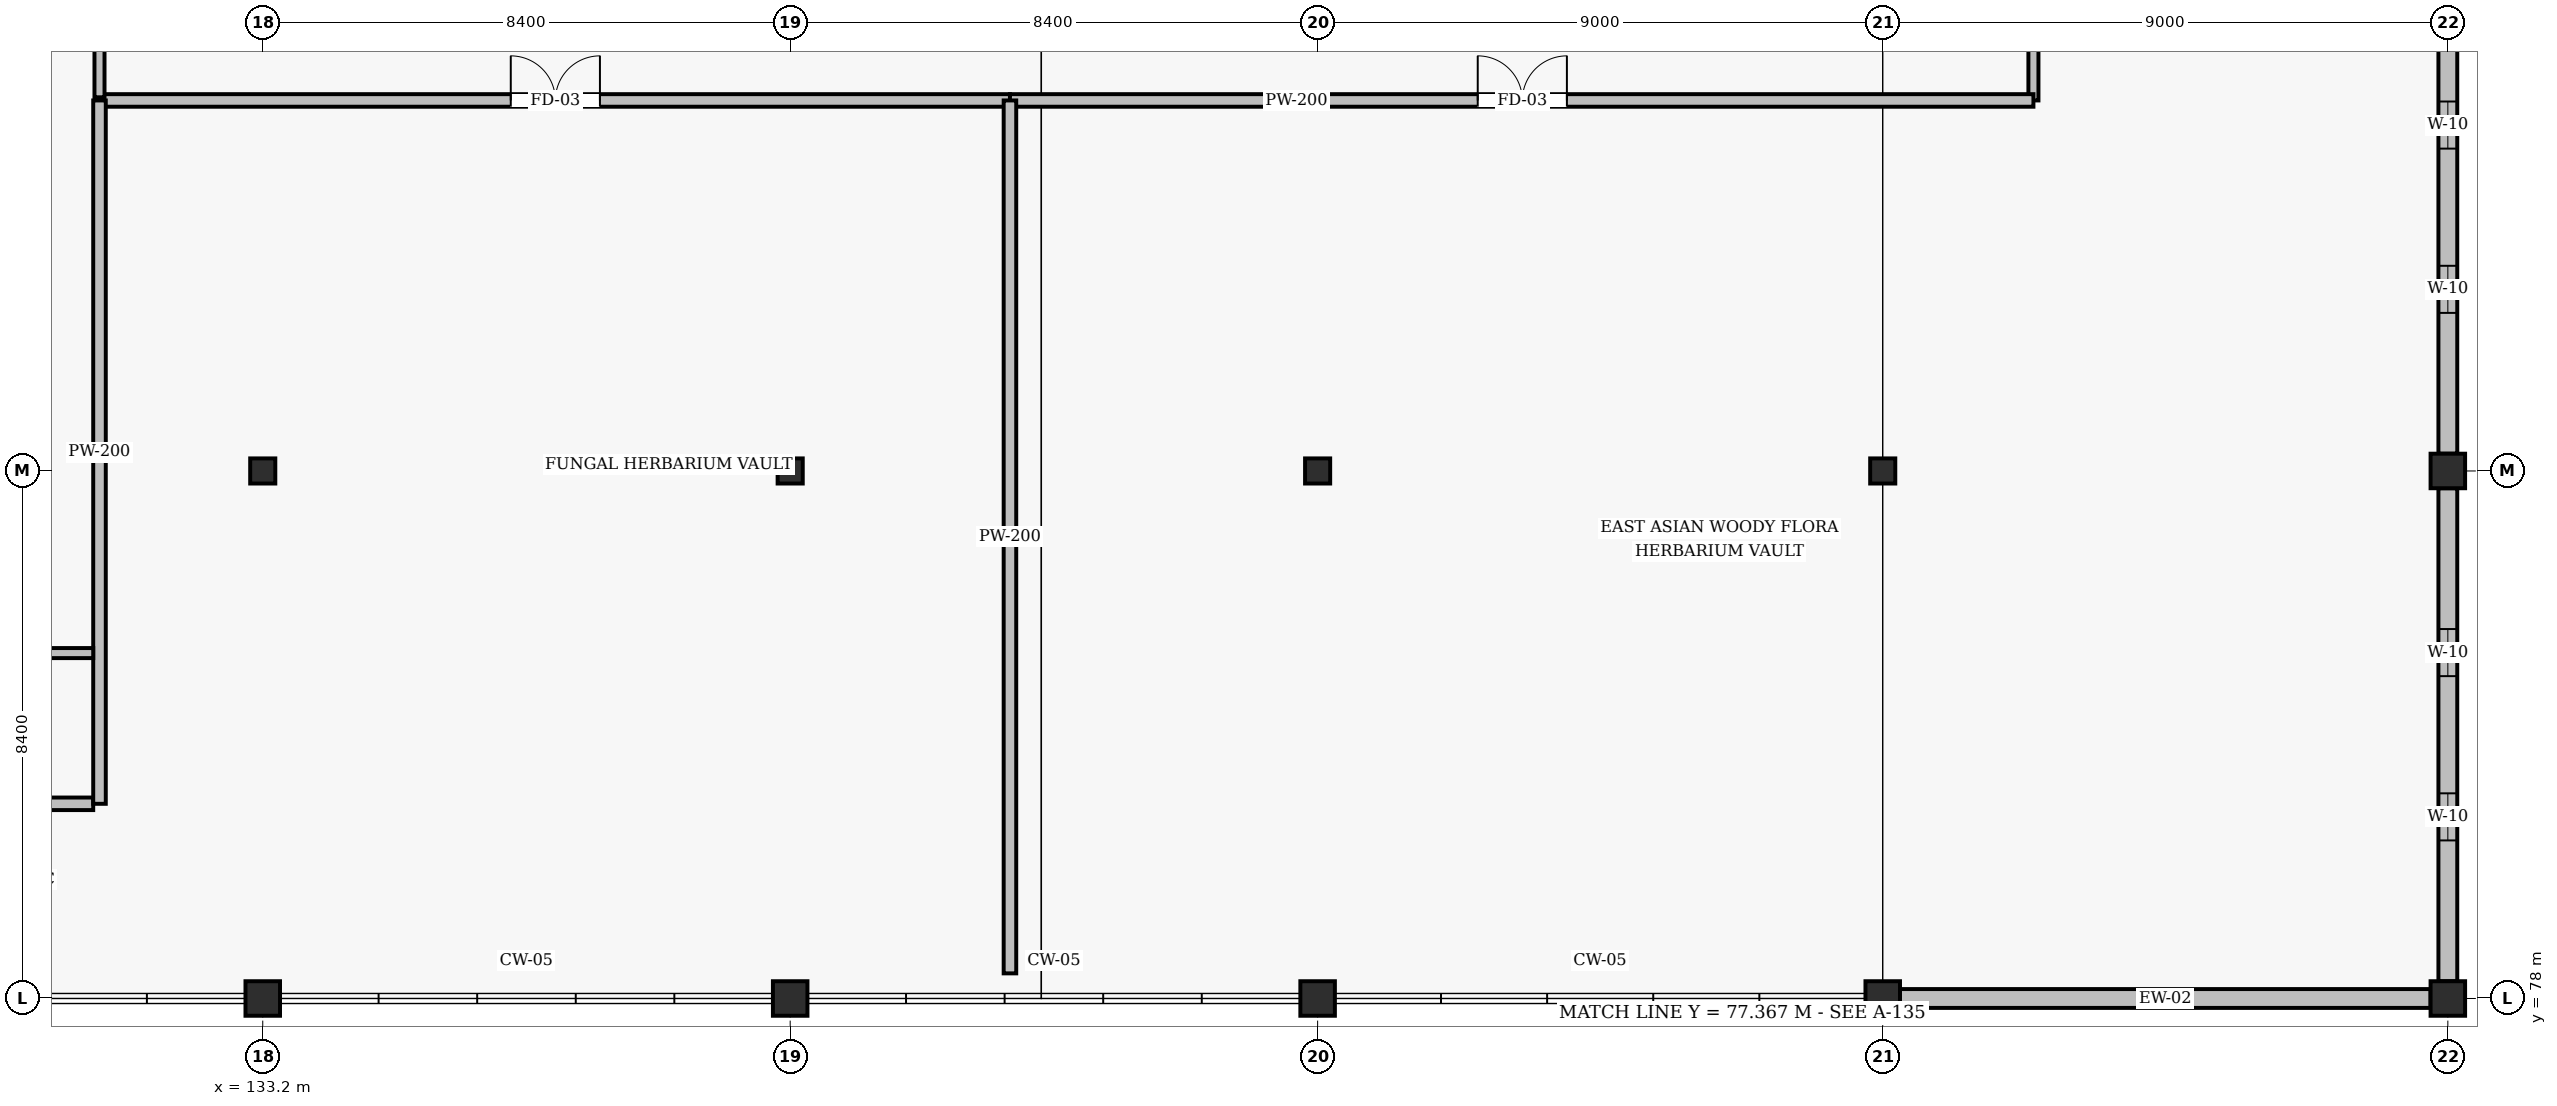
"""IFC4 building model, lengths in metres.
Left out: names, types, materials, properties, quantities, classifications, styles, units other than length and angle.
Written with IfcOpenShell. Run it as: python <this file> out.ifc"""

import sys

from ifc_helpers import new_model, si_unit, direction, frame, frame_2d, origin, origin_2d, place, context, subcontext, project, spatial, rectangle, hollow_rectangle, i_section, extrude, element, fill, save


model = new_model("IFC4")
c1 = context("Model", 3, precision=1e-05, world=origin(), true_north=direction((0.0, 1.0)))
c2 = subcontext(c1, "Body", "Model", "MODEL_VIEW")
j1 = project(units=[si_unit("LENGTHUNIT", "METRE"), si_unit("PLANEANGLEUNIT", "RADIAN")], contexts=[c1])
p1 = place(None, origin())
s1 = spatial("IfcSite", under=j1, at=p1, CompositionType="ELEMENT")
p2 = place(p1, origin())
s2 = spatial("IfcBuilding", under=s1, at=p2, CompositionType="ELEMENT")
p3 = place(p2, frame((0.0, 0.0, 13.2)))
s3 = spatial("IfcBuildingStorey", under=s2, at=p3, CompositionType="ELEMENT", Elevation=13.2)
p4 = place(p3, frame((133.2, 78.0, 0.0), z_axis=(0.0, 0.0, 1.0), x_axis=(1.0, 0.0, 0.0)))
e1 = element("IfcColumn", 1, at=p4, inside=s3, PredefinedType="COLUMN", context=c2, shape_type="SweptSolid", body=[
    extrude(hollow_rectangle(XDim=0.55, YDim=0.55, WallThickness=0.022, InnerFilletRadius=0.022, OuterFilletRadius=0.044, at=origin_2d()), origin(), (0.0, 0.0, 1.0), 3.9),
])
p5 = place(p3, frame((133.2, 86.4, 0.0), z_axis=(0.0, 0.0, 1.0), x_axis=(1.0, 0.0, 0.0)))
e2 = element("IfcColumn", 2, at=p5, inside=s3, PredefinedType="COLUMN", context=c2, shape_type="SweptSolid", body=[
    extrude(i_section(OverallWidth=0.4, OverallDepth=0.4, WebThickness=0.013, FlangeThickness=0.021, FilletRadius=0.022, at=origin_2d()), origin(), (0.0, 0.0, 1.0), 3.9),
])
p6 = place(p3, frame((141.6, 78.0, 0.0), z_axis=(0.0, 0.0, 1.0), x_axis=(1.0, 0.0, 0.0)))
e3 = element("IfcColumn", 3, at=p6, inside=s3, PredefinedType="COLUMN", context=c2, shape_type="SweptSolid", body=[
    extrude(hollow_rectangle(XDim=0.55, YDim=0.55, WallThickness=0.022, InnerFilletRadius=0.022, OuterFilletRadius=0.044, at=origin_2d()), origin(), (0.0, 0.0, 1.0), 3.9),
])
p7 = place(p3, frame((141.6, 86.4, 0.0), z_axis=(0.0, 0.0, 1.0), x_axis=(1.0, 0.0, 0.0)))
e4 = element("IfcColumn", 4, at=p7, inside=s3, PredefinedType="COLUMN", context=c2, shape_type="SweptSolid", body=[
    extrude(i_section(OverallWidth=0.4, OverallDepth=0.4, WebThickness=0.013, FlangeThickness=0.021, FilletRadius=0.022, at=origin_2d()), origin(), (0.0, 0.0, 1.0), 3.9),
])
p8 = place(p3, frame((150.0, 78.0, 0.0), z_axis=(0.0, 0.0, 1.0), x_axis=(1.0, 0.0, 0.0)))
e5 = element("IfcColumn", 5, at=p8, inside=s3, PredefinedType="COLUMN", context=c2, shape_type="SweptSolid", body=[
    extrude(hollow_rectangle(XDim=0.55, YDim=0.55, WallThickness=0.022, InnerFilletRadius=0.022, OuterFilletRadius=0.044, at=origin_2d()), origin(), (0.0, 0.0, 1.0), 3.9),
])
p9 = place(p3, frame((150.0, 86.4, 0.0), z_axis=(0.0, 0.0, 1.0), x_axis=(1.0, 0.0, 0.0)))
e6 = element("IfcColumn", 6, at=p9, inside=s3, PredefinedType="COLUMN", context=c2, shape_type="SweptSolid", body=[
    extrude(i_section(OverallWidth=0.4, OverallDepth=0.4, WebThickness=0.013, FlangeThickness=0.021, FilletRadius=0.022, at=origin_2d()), origin(), (0.0, 0.0, 1.0), 3.9),
])
p10 = place(p3, frame((159.0, 78.0, 0.0), z_axis=(0.0, 0.0, 1.0), x_axis=(1.0, 0.0, 0.0)))
e7 = element("IfcColumn", 7, at=p10, inside=s3, PredefinedType="COLUMN", context=c2, shape_type="SweptSolid", body=[
    extrude(hollow_rectangle(XDim=0.55, YDim=0.55, WallThickness=0.022, InnerFilletRadius=0.022, OuterFilletRadius=0.044, at=origin_2d()), origin(), (0.0, 0.0, 1.0), 3.9),
])
p11 = place(p3, frame((159.0, 86.4, 0.0), z_axis=(0.0, 0.0, 1.0), x_axis=(1.0, 0.0, 0.0)))
e8 = element("IfcColumn", 8, at=p11, inside=s3, PredefinedType="COLUMN", context=c2, shape_type="SweptSolid", body=[
    extrude(i_section(OverallWidth=0.4, OverallDepth=0.4, WebThickness=0.013, FlangeThickness=0.021, FilletRadius=0.022, at=origin_2d()), origin(), (0.0, 0.0, 1.0), 3.9),
])
for number, where, z_axis, x_axis in (
    (9, (168.0, 78.0, 0.0), (0.0, 0.0, 1.0), (1.0, 0.0, 0.0)),
    (10, (168.0, 86.4, 0.0), (0.0, 0.0, 1.0), (1.0, 0.0, 0.0)),
):
    element("IfcColumn", number, at=place(p3, frame(where, z_axis=z_axis, x_axis=x_axis)), inside=s3, PredefinedType="COLUMN", context=c2, shape_type="SweptSolid", body=[
        extrude(hollow_rectangle(XDim=0.55, YDim=0.55, WallThickness=0.022, InnerFilletRadius=0.022, OuterFilletRadius=0.044, at=origin_2d()), origin(), (0.0, 0.0, 1.0), 3.9),
    ])
p12 = place(p3, frame((168.0, 78.275, 0.0), z_axis=(0.0, 0.0, 1.0), x_axis=(0.0, 1.0, 0.0)))
e11 = element("IfcWall", 11, at=p12, inside=s3, PredefinedType="SOLIDWALL", context=c2, shape_type="SweptSolid", body=[
    extrude(rectangle(XDim=7.85, YDim=0.3, at=frame_2d((3.925, 0.0))), origin(), (0.0, 0.0, 1.0), 3.12),
])
p13 = place(p12, frame((2.242, 0.0, 1.05)))
e12 = element("IfcOpeningElement", 12, at=p13, cuts=e11, PredefinedType="OPENING", context=c2, shape_type="SweptSolid", body=[
    extrude(rectangle(XDim=0.75, YDim=1.6, at=frame_2d((0.375, 0.8))), frame((0.0, 0.16, 0.0), z_axis=(0.0, -1.0, 0.0), x_axis=(1.0, 0.0, 0.0)), (0.0, 0.0, 1.0), 0.32),
])
p14 = place(p12, frame((4.858, 0.0, 1.05)))
e13 = element("IfcOpeningElement", 13, at=p14, cuts=e11, PredefinedType="OPENING", context=c2, shape_type="SweptSolid", body=[
    extrude(rectangle(XDim=0.75, YDim=1.6, at=frame_2d((0.375, 0.8))), frame((0.0, 0.16, 0.0), z_axis=(0.0, -1.0, 0.0), x_axis=(1.0, 0.0, 0.0)), (0.0, 0.0, 1.0), 0.32),
])
p15 = place(p3, frame((168.0, 86.675, 0.0), z_axis=(0.0, 0.0, 1.0), x_axis=(0.0, 1.0, 0.0)))
e14 = element("IfcWall", 14, at=p15, inside=s3, PredefinedType="SOLIDWALL", context=c2, shape_type="SweptSolid", body=[
    extrude(rectangle(XDim=7.85, YDim=0.3, at=frame_2d((3.925, 0.0))), origin(), (0.0, 0.0, 1.0), 3.12),
])
p16 = place(p15, frame((2.242, 0.0, 1.05)))
e15 = element("IfcOpeningElement", 15, at=p16, cuts=e14, PredefinedType="OPENING", context=c2, shape_type="SweptSolid", body=[
    extrude(rectangle(XDim=0.75, YDim=1.6, at=frame_2d((0.375, 0.8))), frame((0.0, 0.16, 0.0), z_axis=(0.0, -1.0, 0.0), x_axis=(1.0, 0.0, 0.0)), (0.0, 0.0, 1.0), 0.32),
])
p17 = place(p15, frame((4.858, 0.0, 1.05)))
e16 = element("IfcOpeningElement", 16, at=p17, cuts=e14, PredefinedType="OPENING", context=c2, shape_type="SweptSolid", body=[
    extrude(rectangle(XDim=0.75, YDim=1.6, at=frame_2d((0.375, 0.8))), frame((0.0, 0.16, 0.0), z_axis=(0.0, -1.0, 0.0), x_axis=(1.0, 0.0, 0.0)), (0.0, 0.0, 1.0), 0.32),
])
p18 = place(p3, frame((159.275, 78.0, 0.0), z_axis=(0.0, 0.0, 1.0), x_axis=(1.0, 0.0, 0.0)))
e17 = element("IfcWall", 17, at=p18, inside=s3, PredefinedType="SOLIDWALL", context=c2, shape_type="SweptSolid", body=[
    extrude(rectangle(XDim=8.45, YDim=0.3, at=frame_2d((4.225, 0.0))), origin(), (0.0, 0.0, 1.0), 2.828),
])
p19 = place(p3, frame((161.4, 92.3, 0.0), z_axis=(0.0, 0.0, 1.0), x_axis=(0.0, 1.0, 0.0)))
e18 = element("IfcWall", 18, at=p19, inside=s3, PredefinedType="PARTITIONING", context=c2, shape_type="SweptSolid", body=[
    extrude(rectangle(XDim=14.1, YDim=0.16, at=frame_2d((7.05, 0.0))), origin(), (0.0, 0.0, 1.0), 2.97),
])
p20 = place(p19, frame((6.5, 0.0, 0.0)))
e19 = element("IfcOpeningElement", 19, at=p20, cuts=e18, PredefinedType="OPENING", context=c2, shape_type="SweptSolid", body=[
    extrude(rectangle(XDim=1.08, YDim=2.08, at=frame_2d((0.54, 1.04))), frame((0.0, 0.09, 0.0), z_axis=(0.0, -1.0, 0.0), x_axis=(1.0, 0.0, 0.0)), (0.0, 0.0, 1.0), 0.18),
])
p21 = place(p3, frame((116.8, 81.1, 0.0), z_axis=(0.0, 0.0, 1.0), x_axis=(1.0, 0.0, 0.0)))
e20 = element("IfcWall", 20, at=p21, inside=s3, PredefinedType="SOLIDWALL", context=c2, shape_type="SweptSolid", body=[
    extrude(rectangle(XDim=13.7, YDim=0.2, at=frame_2d((6.85, 0.0))), origin(), (0.0, 0.0, 1.0), 3.23),
])
p22 = place(p21, frame((6.25, 0.0, 0.0)))
e21 = element("IfcOpeningElement", 21, at=p22, cuts=e20, PredefinedType="OPENING", context=c2, shape_type="SweptSolid", body=[
    extrude(rectangle(XDim=1.18, YDim=2.15, at=frame_2d((0.59, 1.075))), frame((0.0, 0.11, 0.0), z_axis=(0.0, -1.0, 0.0), x_axis=(1.0, 0.0, 0.0)), (0.0, 0.0, 1.0), 0.22),
])
p23 = place(p3, frame((130.6, 92.3, 0.0), z_axis=(0.0, 0.0, 1.0), x_axis=(1.0, 0.0, 0.0)))
e22 = element("IfcWall", 22, at=p23, inside=s3, PredefinedType="SOLIDWALL", context=c2, shape_type="SweptSolid", body=[
    extrude(rectangle(XDim=14.5, YDim=0.2, at=frame_2d((7.25, 0.0))), origin(), (0.0, 0.0, 1.0), 3.23),
])
p24 = place(p23, frame((6.55, 0.0, 0.0)))
e23 = element("IfcOpeningElement", 23, at=p24, cuts=e22, PredefinedType="OPENING", context=c2, shape_type="SweptSolid", body=[
    extrude(rectangle(XDim=1.42, YDim=2.18, at=frame_2d((0.71, 1.09))), frame((0.0, 0.11, 0.0), z_axis=(0.0, -1.0, 0.0), x_axis=(1.0, 0.0, 0.0)), (0.0, 0.0, 1.0), 0.22),
])
p25 = place(p3, frame((145.1, 92.3, 0.0), z_axis=(0.0, 0.0, 1.0), x_axis=(1.0, 0.0, 0.0)))
e24 = element("IfcWall", 24, at=p25, inside=s3, PredefinedType="SOLIDWALL", context=c2, shape_type="SweptSolid", body=[
    extrude(rectangle(XDim=16.3, YDim=0.2, at=frame_2d((8.15, 0.0))), origin(), (0.0, 0.0, 1.0), 3.23),
])
p26 = place(p25, frame((7.45, 0.0, 0.0)))
e25 = element("IfcOpeningElement", 25, at=p26, cuts=e24, PredefinedType="OPENING", context=c2, shape_type="SweptSolid", body=[
    extrude(rectangle(XDim=1.42, YDim=2.18, at=frame_2d((0.71, 1.09))), frame((0.0, 0.11, 0.0), z_axis=(0.0, -1.0, 0.0), x_axis=(1.0, 0.0, 0.0)), (0.0, 0.0, 1.0), 0.22),
])
p27 = place(p3, frame((145.1, 78.4, 0.0), z_axis=(0.0, 0.0, 1.0), x_axis=(0.0, 1.0, 0.0)))
e26 = element("IfcWall", 26, at=p27, inside=s3, PredefinedType="SOLIDWALL", context=c2, shape_type="SweptSolid", body=[
    extrude(rectangle(XDim=13.9, YDim=0.2, at=frame_2d((6.95, 0.0))), origin(), (0.0, 0.0, 1.0), 3.07),
])
p28 = place(p3, frame((130.6, 81.1, 0.0), z_axis=(0.0, 0.0, 1.0), x_axis=(0.0, 1.0, 0.0)))
e27 = element("IfcWall", 27, at=p28, inside=s3, PredefinedType="SOLIDWALL", context=c2, shape_type="SweptSolid", body=[
    extrude(rectangle(XDim=11.2, YDim=0.2, at=frame_2d((5.6, 0.0))), origin(), (0.0, 0.0, 1.0), 3.07),
])
p29 = place(p3, frame((130.6, 92.35, 0.0), z_axis=(0.0, 0.0, 1.0), x_axis=(0.0, 1.0, 0.0)))
e28 = element("IfcWall", 28, at=p29, inside=s3, PredefinedType="PARTITIONING", context=c2, shape_type="SweptSolid", body=[
    extrude(rectangle(XDim=14.15, YDim=0.16, at=frame_2d((7.075, 0.0))), origin(), (0.0, 0.0, 1.0), 3.07),
])
p30 = place(p29, frame((6.525, 0.0, 0.0)))
e29 = element("IfcOpeningElement", 29, at=p30, cuts=e28, PredefinedType="OPENING", context=c2, shape_type="SweptSolid", body=[
    extrude(rectangle(XDim=1.08, YDim=2.08, at=frame_2d((0.54, 1.04))), frame((0.0, 0.09, 0.0), z_axis=(0.0, -1.0, 0.0), x_axis=(1.0, 0.0, 0.0)), (0.0, 0.0, 1.0), 0.18),
])
p31 = place(p3, frame((116.8, 83.5, 0.0), z_axis=(0.0, 0.0, 1.0), x_axis=(1.0, 0.0, 0.0)))
e30 = element("IfcWall", 30, at=p31, inside=s3, PredefinedType="PARTITIONING", context=c2, shape_type="SweptSolid", body=[
    extrude(rectangle(XDim=13.7, YDim=0.16, at=frame_2d((6.85, 0.0))), origin(), (0.0, 0.0, 1.0), 3.23),
])
p32 = place(p13, origin())
e31 = element("IfcWindow", 31, at=p32, inside=s3, PartitioningType="SINGLE_PANEL", PredefinedType="WINDOW", context=c2, shape_type="SweptSolid", body=[
    extrude(rectangle(XDim=0.75, YDim=1.6, at=frame_2d((0.375, 0.8))), frame((0.0, 0.03, 0.0), z_axis=(0.0, -1.0, 0.0), x_axis=(1.0, 0.0, 0.0)), (0.0, 0.0, 1.0), 0.06),
])
fill(e12, e31)
p33 = place(p14, origin())
e32 = element("IfcWindow", 32, at=p33, inside=s3, PartitioningType="SINGLE_PANEL", PredefinedType="WINDOW", context=c2, shape_type="SweptSolid", body=[
    extrude(rectangle(XDim=0.75, YDim=1.6, at=frame_2d((0.375, 0.8))), frame((0.0, 0.03, 0.0), z_axis=(0.0, -1.0, 0.0), x_axis=(1.0, 0.0, 0.0)), (0.0, 0.0, 1.0), 0.06),
])
fill(e13, e32)
p34 = place(p16, origin())
e33 = element("IfcWindow", 33, at=p34, inside=s3, PartitioningType="SINGLE_PANEL", PredefinedType="WINDOW", context=c2, shape_type="SweptSolid", body=[
    extrude(rectangle(XDim=0.75, YDim=1.6, at=frame_2d((0.375, 0.8))), frame((0.0, 0.03, 0.0), z_axis=(0.0, -1.0, 0.0), x_axis=(1.0, 0.0, 0.0)), (0.0, 0.0, 1.0), 0.06),
])
fill(e15, e33)
p35 = place(p17, origin())
e34 = element("IfcWindow", 34, at=p35, inside=s3, PartitioningType="SINGLE_PANEL", PredefinedType="WINDOW", context=c2, shape_type="SweptSolid", body=[
    extrude(rectangle(XDim=0.75, YDim=1.6, at=frame_2d((0.375, 0.8))), frame((0.0, 0.03, 0.0), z_axis=(0.0, -1.0, 0.0), x_axis=(1.0, 0.0, 0.0)), (0.0, 0.0, 1.0), 0.06),
])
fill(e16, e34)
p36 = place(p24, origin())
e35 = element("IfcDoor", 35, at=p36, inside=s3, OperationType="DOUBLE_DOOR_SINGLE_SWING", PredefinedType="DOOR", context=c2, shape_type="SweptSolid", body=[
    extrude(rectangle(XDim=1.42, YDim=2.18, at=frame_2d((0.71, 1.09))), frame((0.0, 0.025, 0.0), z_axis=(0.0, -1.0, 0.0), x_axis=(1.0, 0.0, 0.0)), (0.0, 0.0, 1.0), 0.05),
])
fill(e23, e35)
p37 = place(p26, origin())
e36 = element("IfcDoor", 36, at=p37, inside=s3, OperationType="DOUBLE_DOOR_SINGLE_SWING", PredefinedType="DOOR", context=c2, shape_type="SweptSolid", body=[
    extrude(rectangle(XDim=1.42, YDim=2.18, at=frame_2d((0.71, 1.09))), frame((0.0, 0.025, 0.0), z_axis=(0.0, -1.0, 0.0), x_axis=(1.0, 0.0, 0.0)), (0.0, 0.0, 1.0), 0.05),
])
fill(e25, e36)
save(model, sys.argv[1])
